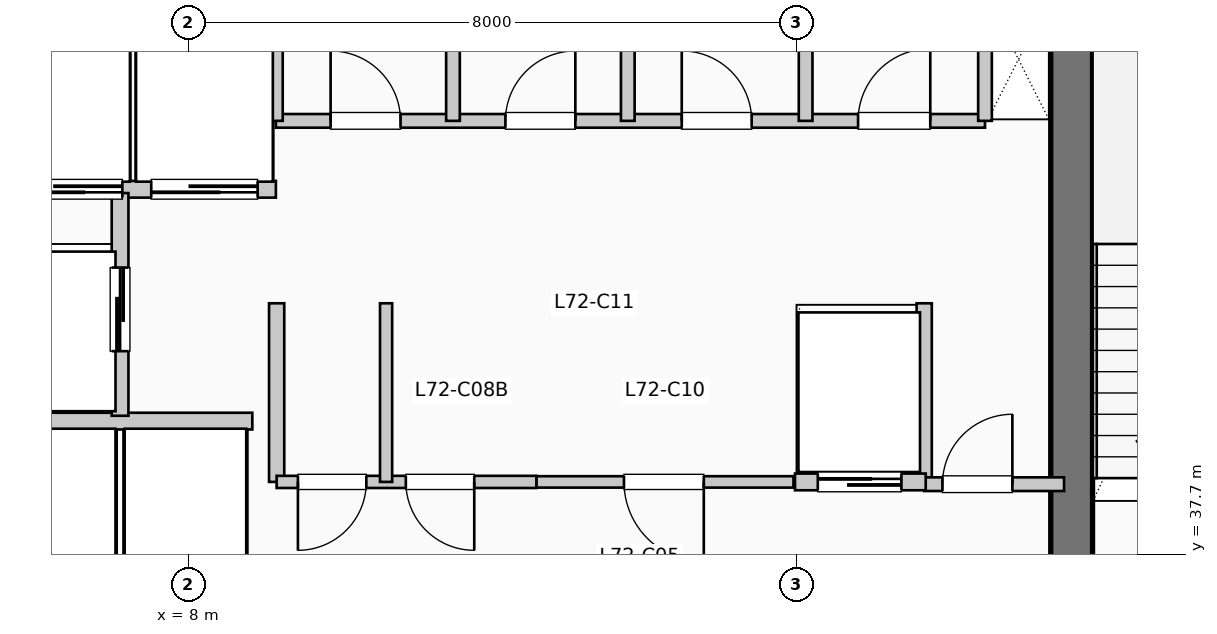
"""IFC4 building model, lengths in metres.
Left out: names, types, materials, properties, quantities, classifications, styles, units other than length and angle.
Written with IfcOpenShell. Run it as: python <this file> out.ifc"""

import sys

from ifc_helpers import new_model, si_unit, direction, frame, frame_2d, origin, place, context, subcontext, project, spatial, rectangle, extrude, element, fill, save


model = new_model("IFC4")
c1 = context("Model", 3, precision=1e-05, world=origin(), true_north=direction((0.0, 1.0)))
c2 = subcontext(c1, "Body", "Model", "MODEL_VIEW")
j1 = project(units=[si_unit("LENGTHUNIT", "METRE"), si_unit("PLANEANGLEUNIT", "RADIAN")], contexts=[c1])
p1 = place(None, origin())
s1 = spatial("IfcSite", under=j1, at=p1, CompositionType="ELEMENT")
p2 = place(p1, origin())
s2 = spatial("IfcBuilding", under=s1, at=p2, CompositionType="ELEMENT")
p3 = place(p2, frame((0.0, 0.0, 296.01)))
s3 = spatial("IfcBuildingStorey", under=s2, at=p3, CompositionType="ELEMENT", Elevation=296.01)
p4 = place(p3, frame((19.62, 37.15, 0.0), z_axis=(0.0, 0.0, 1.0), x_axis=(0.0, 1.0, 0.0)))
e1 = element("IfcWall", 1, at=p4, inside=s3, PredefinedType="SHEAR", context=c2, shape_type="SweptSolid", body=[
    extrude(rectangle(XDim=7.89, YDim=0.55, at=frame_2d((3.945, 0.0))), origin(), (0.0, 0.0, 1.0), 3.96),
])
p5 = place(p3, frame((5.38, 39.45, 0.0), z_axis=(0.0, 0.0, 1.0), x_axis=(1.0, 0.0, 0.0)))
e2 = element("IfcWall", 2, at=p5, inside=s3, PredefinedType="PARTITIONING", context=c2, shape_type="SweptSolid", body=[
    extrude(rectangle(XDim=3.46, YDim=0.22, at=frame_2d((1.73, 0.0))), origin(), (0.0, 0.0, 1.0), 3.74),
])
p6 = place(p3, frame((5.38, 42.5, 0.0), z_axis=(0.0, 0.0, 1.0), x_axis=(1.0, 0.0, 0.0)))
e3 = element("IfcWall", 3, at=p6, inside=s3, PredefinedType="PARTITIONING", context=c2, shape_type="SweptSolid", body=[
    extrude(rectangle(XDim=3.77, YDim=0.22, at=frame_2d((1.885, 0.0))), origin(), (0.0, 0.0, 1.0), 3.74),
])
p7 = place(p6, frame((1.75, 0.0, 0.0), z_axis=(0.0, 0.0, 1.0), x_axis=(-1.0, 0.0, 0.0)))
e4 = element("IfcOpeningElement", 4, at=p7, cuts=e3, PredefinedType="OPENING", context=c2, shape_type="SweptSolid", body=[
    extrude(rectangle(XDim=1.4, YDim=2.2, at=frame_2d((0.7, 1.1))), frame((0.0, 0.12, 0.0), z_axis=(0.0, -1.0, 0.0), x_axis=(1.0, 0.0, 0.0)), (0.0, 0.0, 1.0), 0.24),
])
p8 = place(p6, frame((3.53, 0.0, 0.0), z_axis=(0.0, 0.0, 1.0), x_axis=(-1.0, 0.0, 0.0)))
e5 = element("IfcOpeningElement", 5, at=p8, cuts=e3, PredefinedType="OPENING", context=c2, shape_type="SweptSolid", body=[
    extrude(rectangle(XDim=1.4, YDim=2.2, at=frame_2d((0.7, 1.1))), frame((0.0, 0.12, 0.0), z_axis=(0.0, -1.0, 0.0), x_axis=(1.0, 0.0, 0.0)), (0.0, 0.0, 1.0), 0.24),
])
p9 = place(p3, frame((7.1, 39.52, 0.0), z_axis=(0.0, 0.0, 1.0), x_axis=(0.0, 1.0, 0.0)))
e6 = element("IfcWall", 6, at=p9, inside=s3, PredefinedType="PARTITIONING", context=c2, shape_type="SweptSolid", body=[
    extrude(rectangle(XDim=2.93, YDim=0.22, at=frame_2d((1.465, 0.0))), origin(), (0.0, 0.0, 1.0), 3.74),
])
p10 = place(p9, frame((0.85, 0.0, 0.0)))
e7 = element("IfcOpeningElement", 7, at=p10, cuts=e6, PredefinedType="OPENING", context=c2, shape_type="SweptSolid", body=[
    extrude(rectangle(XDim=1.1, YDim=2.2, at=frame_2d((0.55, 1.1))), frame((0.0, 0.12, 0.0), z_axis=(0.0, -1.0, 0.0), x_axis=(1.0, 0.0, 0.0)), (0.0, 0.0, 1.0), 0.24),
])
for number, where, z_axis, x_axis in (
    (8, (9.16, 38.65, 0.0), (0.0, 0.0, 1.0), (0.0, 1.0, 0.0)),
    (9, (17.68, 38.65, 0.0), (0.0, 0.0, 1.0), (0.0, 1.0, 0.0)),
):
    element("IfcWall", number, at=place(p3, frame(where, z_axis=z_axis, x_axis=x_axis)), inside=s3, PredefinedType="PARTITIONING", context=c2, shape_type="SweptSolid", body=[
        extrude(rectangle(XDim=2.35, YDim=0.2, at=frame_2d((1.175, 0.0))), origin(), (0.0, 0.0, 1.0), 3.74),
    ])
p11 = place(p3, frame((17.68, 38.62, 0.0), z_axis=(0.0, 0.0, 1.0), x_axis=(1.0, 0.0, 0.0)))
e10 = element("IfcWall", 10, at=p11, inside=s3, PredefinedType="PARTITIONING", context=c2, shape_type="SweptSolid", body=[
    extrude(rectangle(XDim=1.84, YDim=0.18, at=frame_2d((0.92, 0.0))), origin(), (0.0, 0.0, 1.0), 3.74),
])
p12 = place(p11, frame((0.24, 0.0, 0.0)))
e11 = element("IfcOpeningElement", 11, at=p12, cuts=e10, PredefinedType="OPENING", context=c2, shape_type="SweptSolid", body=[
    extrude(rectangle(XDim=0.92, YDim=2.1, at=frame_2d((0.46, 1.05))), frame((0.0, 0.1, 0.0), z_axis=(0.0, -1.0, 0.0), x_axis=(1.0, 0.0, 0.0)), (0.0, 0.0, 1.0), 0.2),
])
p13 = place(p3, frame((9.16, 38.65, 0.0), z_axis=(0.0, 0.0, 1.0), x_axis=(1.0, 0.0, 0.0)))
e12 = element("IfcWall", 12, at=p13, inside=s3, PredefinedType="PARTITIONING", context=c2, shape_type="SweptSolid", body=[
    extrude(rectangle(XDim=3.42, YDim=0.16, at=frame_2d((1.71, 0.0))), origin(), (0.0, 0.0, 1.0), 3.74),
])
p14 = place(p13, frame((1.18, 0.0, 0.0), z_axis=(0.0, 0.0, 1.0), x_axis=(-1.0, 0.0, 0.0)))
e13 = element("IfcOpeningElement", 13, at=p14, cuts=e12, PredefinedType="OPENING", context=c2, shape_type="SweptSolid", body=[
    extrude(rectangle(XDim=0.9, YDim=2.15, at=frame_2d((0.45, 1.075))), frame((0.0, 0.09, 0.0), z_axis=(0.0, -1.0, 0.0), x_axis=(1.0, 0.0, 0.0)), (0.0, 0.0, 1.0), 0.18),
])
p15 = place(p13, frame((2.6, 0.0, 0.0), z_axis=(0.0, 0.0, 1.0), x_axis=(-1.0, 0.0, 0.0)))
e14 = element("IfcOpeningElement", 14, at=p15, cuts=e12, PredefinedType="OPENING", context=c2, shape_type="SweptSolid", body=[
    extrude(rectangle(XDim=0.9, YDim=2.15, at=frame_2d((0.45, 1.075))), frame((0.0, 0.09, 0.0), z_axis=(0.0, -1.0, 0.0), x_axis=(1.0, 0.0, 0.0)), (0.0, 0.0, 1.0), 0.18),
])
p16 = place(p3, frame((10.6, 38.65, 0.0), z_axis=(0.0, 0.0, 1.0), x_axis=(0.0, 1.0, 0.0)))
e15 = element("IfcWall", 15, at=p16, inside=s3, PredefinedType="PARTITIONING", context=c2, shape_type="SweptSolid", body=[
    extrude(rectangle(XDim=2.35, YDim=0.16, at=frame_2d((1.175, 0.0))), origin(), (0.0, 0.0, 1.0), 3.74),
])
p17 = place(p3, frame((12.58, 38.65, 0.0), z_axis=(0.0, 0.0, 1.0), x_axis=(1.0, 0.0, 0.0)))
e16 = element("IfcWall", 16, at=p17, inside=s3, PredefinedType="PARTITIONING", context=c2, shape_type="SweptSolid", body=[
    extrude(rectangle(XDim=3.38, YDim=0.15, at=frame_2d((1.69, 0.0))), origin(), (0.0, 0.0, 1.0), 3.74),
])
p18 = place(p17, frame((2.2, 0.0, 0.0), z_axis=(0.0, 0.0, 1.0), x_axis=(-1.0, 0.0, 0.0)))
e17 = element("IfcOpeningElement", 17, at=p18, cuts=e16, PredefinedType="OPENING", context=c2, shape_type="SweptSolid", body=[
    extrude(rectangle(XDim=1.05, YDim=2.15, at=frame_2d((0.525, 1.075))), frame((0.0, 0.085, 0.0), z_axis=(0.0, -1.0, 0.0), x_axis=(1.0, 0.0, 0.0)), (0.0, 0.0, 1.0), 0.17),
])
p19 = place(p3, frame((15.98, 38.65, 0.0), z_axis=(0.0, 0.0, 1.0), x_axis=(1.0, 0.0, 0.0)))
e18 = element("IfcWall", 18, at=p19, inside=s3, PredefinedType="PARTITIONING", context=c2, shape_type="SweptSolid", body=[
    extrude(rectangle(XDim=1.72, YDim=0.22, at=frame_2d((0.86, 0.0))), origin(), (0.0, 0.0, 1.0), 3.74),
])
p20 = place(p19, frame((0.3, 0.0, 0.0)))
e19 = element("IfcOpeningElement", 19, at=p20, cuts=e18, PredefinedType="OPENING", context=c2, shape_type="SweptSolid", body=[
    extrude(rectangle(XDim=1.1, YDim=2.2, at=frame_2d((0.55, 1.1))), frame((0.0, 0.12, 0.0), z_axis=(0.0, -1.0, 0.0), x_axis=(1.0, 0.0, 0.0)), (0.0, 0.0, 1.0), 0.24),
])
p21 = place(p3, frame((9.15, 43.4, 0.0), z_axis=(0.0, 0.0, 1.0), x_axis=(1.0, 0.0, 0.0)))
e20 = element("IfcWall", 20, at=p21, inside=s3, PredefinedType="PLUMBINGWALL", context=c2, shape_type="SweptSolid", body=[
    extrude(rectangle(XDim=9.33, YDim=0.18, at=frame_2d((4.665, 0.0))), origin(), (0.0, 0.0, 1.0), 3.74),
])
p22 = place(p21, frame((0.72, 0.0, 0.0)))
e21 = element("IfcOpeningElement", 21, at=p22, cuts=e20, PredefinedType="OPENING", context=c2, shape_type="SweptSolid", body=[
    extrude(rectangle(XDim=0.92, YDim=2.1, at=frame_2d((0.46, 1.05))), frame((0.0, 0.1, 0.0), z_axis=(0.0, -1.0, 0.0), x_axis=(1.0, 0.0, 0.0)), (0.0, 0.0, 1.0), 0.2),
])
p23 = place(p21, frame((3.02, 0.0, 0.0)))
e22 = element("IfcOpeningElement", 22, at=p23, cuts=e20, PredefinedType="OPENING", context=c2, shape_type="SweptSolid", body=[
    extrude(rectangle(XDim=0.92, YDim=2.1, at=frame_2d((0.46, 1.05))), frame((0.0, 0.1, 0.0), z_axis=(0.0, -1.0, 0.0), x_axis=(1.0, 0.0, 0.0)), (0.0, 0.0, 1.0), 0.2),
])
p24 = place(p21, frame((5.34, 0.0, 0.0)))
e23 = element("IfcOpeningElement", 23, at=p24, cuts=e20, PredefinedType="OPENING", context=c2, shape_type="SweptSolid", body=[
    extrude(rectangle(XDim=0.92, YDim=2.1, at=frame_2d((0.46, 1.05))), frame((0.0, 0.1, 0.0), z_axis=(0.0, -1.0, 0.0), x_axis=(1.0, 0.0, 0.0)), (0.0, 0.0, 1.0), 0.2),
])
p25 = place(p21, frame((7.66, 0.0, 0.0)))
e24 = element("IfcOpeningElement", 24, at=p25, cuts=e20, PredefinedType="OPENING", context=c2, shape_type="SweptSolid", body=[
    extrude(rectangle(XDim=0.95, YDim=2.1, at=frame_2d((0.475, 1.05))), frame((0.0, 0.1, 0.0), z_axis=(0.0, -1.0, 0.0), x_axis=(1.0, 0.0, 0.0)), (0.0, 0.0, 1.0), 0.2),
])
for number, where, z_axis, x_axis in (
    (25, (9.15, 43.4, 0.0), (0.0, 0.0, 1.0), (0.0, 1.0, 0.0)),
    (26, (18.48, 43.4, 0.0), (0.0, 0.0, 1.0), (0.0, 1.0, 0.0)),
    (27, (11.48, 43.4, 0.0), (0.0, 0.0, 1.0), (0.0, 1.0, 0.0)),
    (28, (13.78, 43.4, 0.0), (0.0, 0.0, 1.0), (0.0, 1.0, 0.0)),
    (29, (16.12, 43.4, 0.0), (0.0, 0.0, 1.0), (0.0, 1.0, 0.0)),
):
    element("IfcWall", number, at=place(p3, frame(where, z_axis=z_axis, x_axis=x_axis)), inside=s3, PredefinedType="PLUMBINGWALL", context=c2, shape_type="SweptSolid", body=[
        extrude(rectangle(XDim=1.88, YDim=0.18, at=frame_2d((0.94, 0.0))), origin(), (0.0, 0.0, 1.0), 3.74),
    ])
p26 = place(p7, origin())
e30 = element("IfcDoor", 30, at=p26, inside=s3, OperationType="SLIDING_TO_LEFT", PredefinedType="DOOR", context=c2, shape_type="SweptSolid", body=[
    extrude(rectangle(XDim=1.4, YDim=2.2, at=frame_2d((0.7, 1.1))), frame((0.0, 0.025, 0.0), z_axis=(0.0, -1.0, 0.0), x_axis=(1.0, 0.0, 0.0)), (0.0, 0.0, 1.0), 0.05),
])
fill(e4, e30)
p27 = place(p8, origin())
e31 = element("IfcDoor", 31, at=p27, inside=s3, OperationType="SLIDING_TO_LEFT", PredefinedType="DOOR", context=c2, shape_type="SweptSolid", body=[
    extrude(rectangle(XDim=1.4, YDim=2.2, at=frame_2d((0.7, 1.1))), frame((0.0, 0.025, 0.0), z_axis=(0.0, -1.0, 0.0), x_axis=(1.0, 0.0, 0.0)), (0.0, 0.0, 1.0), 0.05),
])
fill(e5, e31)
p28 = place(p10, origin())
e32 = element("IfcDoor", 32, at=p28, inside=s3, OperationType="SLIDING_TO_LEFT", PredefinedType="DOOR", context=c2, shape_type="SweptSolid", body=[
    extrude(rectangle(XDim=1.1, YDim=2.2, at=frame_2d((0.55, 1.1))), frame((0.0, 0.025, 0.0), z_axis=(0.0, -1.0, 0.0), x_axis=(1.0, 0.0, 0.0)), (0.0, 0.0, 1.0), 0.05),
])
fill(e7, e32)
p29 = place(p12, origin())
e33 = element("IfcDoor", 33, at=p29, inside=s3, OperationType="SINGLE_SWING_RIGHT", PredefinedType="DOOR", context=c2, shape_type="SweptSolid", body=[
    extrude(rectangle(XDim=0.92, YDim=2.1, at=frame_2d((0.46, 1.05))), frame((0.0, 0.025, 0.0), z_axis=(0.0, -1.0, 0.0), x_axis=(1.0, 0.0, 0.0)), (0.0, 0.0, 1.0), 0.05),
])
fill(e11, e33)
p30 = place(p14, origin())
e34 = element("IfcDoor", 34, at=p30, inside=s3, OperationType="SINGLE_SWING_LEFT", PredefinedType="DOOR", context=c2, shape_type="SweptSolid", body=[
    extrude(rectangle(XDim=0.9, YDim=2.15, at=frame_2d((0.45, 1.075))), frame((0.0, 0.025, 0.0), z_axis=(0.0, -1.0, 0.0), x_axis=(1.0, 0.0, 0.0)), (0.0, 0.0, 1.0), 0.05),
])
fill(e13, e34)
p31 = place(p15, origin())
e35 = element("IfcDoor", 35, at=p31, inside=s3, OperationType="SINGLE_SWING_RIGHT", PredefinedType="DOOR", context=c2, shape_type="SweptSolid", body=[
    extrude(rectangle(XDim=0.9, YDim=2.15, at=frame_2d((0.45, 1.075))), frame((0.0, 0.025, 0.0), z_axis=(0.0, -1.0, 0.0), x_axis=(1.0, 0.0, 0.0)), (0.0, 0.0, 1.0), 0.05),
])
fill(e14, e35)
p32 = place(p18, origin())
e36 = element("IfcDoor", 36, at=p32, inside=s3, OperationType="SINGLE_SWING_RIGHT", PredefinedType="DOOR", context=c2, shape_type="SweptSolid", body=[
    extrude(rectangle(XDim=1.05, YDim=2.15, at=frame_2d((0.525, 1.075))), frame((0.0, 0.025, 0.0), z_axis=(0.0, -1.0, 0.0), x_axis=(1.0, 0.0, 0.0)), (0.0, 0.0, 1.0), 0.05),
])
fill(e17, e36)
p33 = place(p20, origin())
e37 = element("IfcDoor", 37, at=p33, inside=s3, OperationType="SLIDING_TO_LEFT", PredefinedType="DOOR", context=c2, shape_type="SweptSolid", body=[
    extrude(rectangle(XDim=1.1, YDim=2.2, at=frame_2d((0.55, 1.1))), frame((0.0, 0.025, 0.0), z_axis=(0.0, -1.0, 0.0), x_axis=(1.0, 0.0, 0.0)), (0.0, 0.0, 1.0), 0.05),
])
fill(e19, e37)
p34 = place(p22, origin())
e38 = element("IfcDoor", 38, at=p34, inside=s3, OperationType="SINGLE_SWING_LEFT", PredefinedType="DOOR", context=c2, shape_type="SweptSolid", body=[
    extrude(rectangle(XDim=0.92, YDim=2.1, at=frame_2d((0.46, 1.05))), frame((0.0, 0.025, 0.0), z_axis=(0.0, -1.0, 0.0), x_axis=(1.0, 0.0, 0.0)), (0.0, 0.0, 1.0), 0.05),
])
fill(e21, e38)
p35 = place(p23, origin())
e39 = element("IfcDoor", 39, at=p35, inside=s3, OperationType="SINGLE_SWING_RIGHT", PredefinedType="DOOR", context=c2, shape_type="SweptSolid", body=[
    extrude(rectangle(XDim=0.92, YDim=2.1, at=frame_2d((0.46, 1.05))), frame((0.0, 0.025, 0.0), z_axis=(0.0, -1.0, 0.0), x_axis=(1.0, 0.0, 0.0)), (0.0, 0.0, 1.0), 0.05),
])
fill(e22, e39)
p36 = place(p24, origin())
e40 = element("IfcDoor", 40, at=p36, inside=s3, OperationType="SINGLE_SWING_LEFT", PredefinedType="DOOR", context=c2, shape_type="SweptSolid", body=[
    extrude(rectangle(XDim=0.92, YDim=2.1, at=frame_2d((0.46, 1.05))), frame((0.0, 0.025, 0.0), z_axis=(0.0, -1.0, 0.0), x_axis=(1.0, 0.0, 0.0)), (0.0, 0.0, 1.0), 0.05),
])
fill(e23, e40)
p37 = place(p25, origin())
e41 = element("IfcDoor", 41, at=p37, inside=s3, OperationType="SINGLE_SWING_RIGHT", PredefinedType="DOOR", context=c2, shape_type="SweptSolid", body=[
    extrude(rectangle(XDim=0.95, YDim=2.1, at=frame_2d((0.475, 1.05))), frame((0.0, 0.025, 0.0), z_axis=(0.0, -1.0, 0.0), x_axis=(1.0, 0.0, 0.0)), (0.0, 0.0, 1.0), 0.05),
])
fill(e24, e41)
save(model, sys.argv[1])
